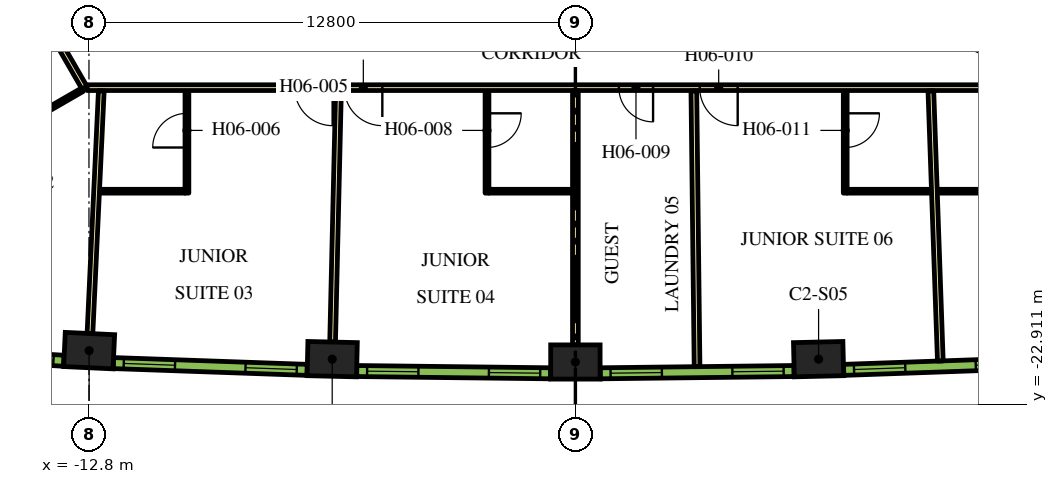
"""IFC4 building model, lengths in metres.
Left out: names, types, materials, properties, quantities, classifications, styles, units other than length and angle.
Written with IfcOpenShell. Run it as: python <this file> out.ifc"""

import sys

from ifc_helpers import new_model, si_unit, direction, frame, frame_2d, origin, origin_2d, place, context, subcontext, project, spatial, rectangle, extrude, element, fill, save


model = new_model("IFC4")
c1 = context("Model", 3, precision=1e-05, world=origin(), true_north=direction((0.0, 1.0)))
c2 = subcontext(c1, "Body", "Model", "MODEL_VIEW")
j1 = project(units=[si_unit("LENGTHUNIT", "METRE"), si_unit("PLANEANGLEUNIT", "RADIAN")], contexts=[c1])
p1 = place(None, origin())
s1 = spatial("IfcSite", under=j1, at=p1, CompositionType="ELEMENT")
p2 = place(p1, origin())
s2 = spatial("IfcBuilding", under=s1, at=p2, CompositionType="ELEMENT")
p3 = place(p2, frame((0.0, 0.0, 83.7)))
s3 = spatial("IfcBuildingStorey", under=s2, at=p3, CompositionType="ELEMENT", Elevation=83.7)
for number, where, z_axis, x_axis in (
    (1, (-12.795, -21.494, 0.0), (0.0, 0.0, 1.0), (0.999, -0.047, 0.0)),
    (2, (-6.399, -21.719, 0.0), (0.0, 0.0, 1.0), (1.0, -0.023, 0.0)),
    (3, (0.0, -21.794, 0.0), (0.0, 0.0, 1.0), (1.0, 0.0, 0.0)),
    (4, (6.399, -21.719, 0.0), (0.0, 0.0, 1.0), (1.0, 0.023, 0.0)),
):
    element("IfcColumn", number, at=place(p3, frame(where, z_axis=z_axis, x_axis=x_axis)), inside=s3, PredefinedType="COLUMN", context=c2, shape_type="SweptSolid", body=[
        extrude(rectangle(XDim=1.3, YDim=0.9, at=origin_2d()), origin(), (0.0, 0.0, 1.0), 3.9),
    ])
p4 = place(p3, frame((-12.918, -14.575, 0.0), z_axis=(0.0, 0.0, 1.0), x_axis=(-0.500009150678, 0.866020120573, 0.0)))
e5 = element("IfcWall", 5, at=p4, inside=s3, PredefinedType="PARTITIONING", context=c2, shape_type="SweptSolid", body=[
    extrude(rectangle(XDim=5.258, YDim=0.15, at=frame_2d((2.629, 0.0))), origin(), (0.0, 0.0, 1.0), 2.75),
])
p5 = place(p4, frame((4.078, 0.0, 0.0)))
e6 = element("IfcOpeningElement", 6, at=p5, cuts=e5, PredefinedType="OPENING", context=c2, shape_type="SweptSolid", body=[
    extrude(rectangle(XDim=1.0, YDim=2.1, at=frame_2d((0.5, 1.05))), frame((0.0, 0.085, 0.0), z_axis=(0.0, -1.0, 0.0), x_axis=(1.0, 0.0, 0.0)), (0.0, 0.0, 1.0), 0.17),
])
p6 = place(p3, frame((12.918, -14.575, 0.0), z_axis=(0.0, 0.0, 1.0), x_axis=(-1.0, 0.0, 0.0)))
e7 = element("IfcWall", 7, at=p6, inside=s3, PredefinedType="PARTITIONING", context=c2, shape_type="SweptSolid", body=[
    extrude(rectangle(XDim=25.766, YDim=0.15, at=frame_2d((12.883, 0.0))), origin(), (0.0, 0.0, 1.0), 2.75),
])
p7 = place(p6, frame((19.306, 0.0, 0.0)))
e8 = element("IfcOpeningElement", 8, at=p7, cuts=e7, PredefinedType="OPENING", context=c2, shape_type="SweptSolid", body=[
    extrude(rectangle(XDim=1.0, YDim=2.1, at=frame_2d((0.5, 1.05))), frame((0.0, 0.085, 0.0), z_axis=(0.0, -1.0, 0.0), x_axis=(1.0, 0.0, 0.0)), (0.0, 0.0, 1.0), 0.17),
])
p8 = place(p6, frame((17.999, 0.0, 0.0)))
e9 = element("IfcOpeningElement", 9, at=p8, cuts=e7, PredefinedType="OPENING", context=c2, shape_type="SweptSolid", body=[
    extrude(rectangle(XDim=1.0, YDim=2.1, at=frame_2d((0.5, 1.05))), frame((0.0, 0.085, 0.0), z_axis=(0.0, -1.0, 0.0), x_axis=(1.0, 0.0, 0.0)), (0.0, 0.0, 1.0), 0.17),
])
p9 = place(p6, frame((10.874, 0.0, 0.0)))
e10 = element("IfcOpeningElement", 10, at=p9, cuts=e7, PredefinedType="OPENING", context=c2, shape_type="SweptSolid", body=[
    extrude(rectangle(XDim=0.9, YDim=2.1, at=frame_2d((0.45, 1.05))), frame((0.0, 0.085, 0.0), z_axis=(0.0, -1.0, 0.0), x_axis=(1.0, 0.0, 0.0)), (0.0, 0.0, 1.0), 0.17),
])
p10 = place(p6, frame((8.647, 0.0, 0.0)))
e11 = element("IfcOpeningElement", 11, at=p10, cuts=e7, PredefinedType="OPENING", context=c2, shape_type="SweptSolid", body=[
    extrude(rectangle(XDim=1.0, YDim=2.1, at=frame_2d((0.5, 1.05))), frame((0.0, 0.085, 0.0), z_axis=(0.0, -1.0, 0.0), x_axis=(1.0, 0.0, 0.0)), (0.0, 0.0, 1.0), 0.17),
])
p11 = place(p6, frame((0.18, 0.0, 0.0)))
e12 = element("IfcOpeningElement", 12, at=p11, cuts=e7, PredefinedType="OPENING", context=c2, shape_type="SweptSolid", body=[
    extrude(rectangle(XDim=1.0, YDim=2.1, at=frame_2d((0.5, 1.05))), frame((0.0, 0.085, 0.0), z_axis=(0.0, -1.0, 0.0), x_axis=(1.0, 0.0, 0.0)), (0.0, 0.0, 1.0), 0.17),
])
p12 = place(p3, frame((-12.774, -21.045, 0.0), z_axis=(0.0, 0.0, 1.0), x_axis=(0.046750341626, 0.998906605023, 0.0)))
e13 = element("IfcWall", 13, at=p12, inside=s3, PredefinedType="PARTITIONING", context=c2, shape_type="SweptSolid", body=[
    extrude(rectangle(XDim=6.392, YDim=0.15, at=frame_2d((3.196, 0.0))), origin(), (0.0, 0.0, 1.0), 2.75),
])
p13 = place(p3, frame((-6.389, -21.269, 0.0), z_axis=(0.0, 0.0, 1.0), x_axis=(0.023377429176, 0.999726710559, 0.0)))
e14 = element("IfcWall", 14, at=p13, inside=s3, PredefinedType="PARTITIONING", context=c2, shape_type="SweptSolid", body=[
    extrude(rectangle(XDim=6.611, YDim=0.15, at=frame_2d((3.305, 0.0))), origin(), (0.0, 0.0, 1.0), 2.75),
])
p14 = place(p3, frame((0.0, -21.344, 0.0), z_axis=(0.0, 0.0, 1.0), x_axis=(0.0, 1.0, 0.0)))
e15 = element("IfcWall", 15, at=p14, inside=s3, PredefinedType="PARTITIONING", context=c2, shape_type="SweptSolid", body=[
    extrude(rectangle(XDim=6.694, YDim=0.15, at=frame_2d((3.347, 0.0))), origin(), (0.0, 0.0, 1.0), 2.75),
])
p15 = place(p3, frame((3.202, -21.916, 0.0), z_axis=(0.0, 0.0, 1.0), x_axis=(-0.011707696285, 0.999931462575, 0.0)))
e16 = element("IfcWall", 16, at=p15, inside=s3, PredefinedType="PARTITIONING", context=c2, shape_type="SweptSolid", body=[
    extrude(rectangle(XDim=7.257, YDim=0.15, at=frame_2d((3.628, 0.0))), origin(), (0.0, 0.0, 1.0), 2.75),
])
p16 = place(p3, frame((9.603, -21.767, 0.0), z_axis=(0.0, 0.0, 1.0), x_axis=(-0.035053506859, 0.999385436985, 0.0)))
e17 = element("IfcWall", 17, at=p16, inside=s3, PredefinedType="PARTITIONING", context=c2, shape_type="SweptSolid", body=[
    extrude(rectangle(XDim=7.111, YDim=0.15, at=frame_2d((3.556, 0.0))), origin(), (0.0, 0.0, 1.0), 2.75),
])
p17 = place(p3, frame((-12.973, -14.63, 0.0), z_axis=(0.0, 0.0, 1.0), x_axis=(-0.866036505625, -0.499980770555, 0.0)))
e18 = element("IfcWall", 18, at=p17, inside=s3, PredefinedType="PARTITIONING", context=c2, shape_type="SweptSolid", body=[
    extrude(rectangle(XDim=2.7, YDim=0.1, at=frame_2d((1.35, 0.0))), origin(), (0.0, 0.0, 1.0), 2.75),
])
p18 = place(p3, frame((-10.222, -17.35, 0.0), z_axis=(0.0, 0.0, 1.0), x_axis=(0.0, 1.0, 0.0)))
e19 = element("IfcWall", 19, at=p18, inside=s3, PredefinedType="PARTITIONING", context=c2, shape_type="SweptSolid", body=[
    extrude(rectangle(XDim=2.7, YDim=0.1, at=frame_2d((1.35, 0.0))), origin(), (0.0, 0.0, 1.0), 2.75),
])
p19 = place(p18, frame((1.2, 0.0, 0.0)))
e20 = element("IfcOpeningElement", 20, at=p19, cuts=e19, PredefinedType="OPENING", context=c2, shape_type="SweptSolid", body=[
    extrude(rectangle(XDim=0.9, YDim=2.1, at=frame_2d((0.45, 1.05))), frame((0.0, 0.06, 0.0), z_axis=(0.0, -1.0, 0.0), x_axis=(1.0, 0.0, 0.0)), (0.0, 0.0, 1.0), 0.12),
])
p20 = place(p3, frame((-10.272, -17.3, 0.0), z_axis=(0.0, 0.0, 1.0), x_axis=(-1.0, 0.0, 0.0)))
e21 = element("IfcWall", 21, at=p20, inside=s3, PredefinedType="PARTITIONING", context=c2, shape_type="SweptSolid", body=[
    extrude(rectangle(XDim=2.25, YDim=0.1, at=frame_2d((1.125, 0.0))), origin(), (0.0, 0.0, 1.0), 2.75),
])
p21 = place(p3, frame((-2.326, -14.65, 0.0), z_axis=(0.0, 0.0, 1.0), x_axis=(0.0, -1.0, 0.0)))
e22 = element("IfcWall", 22, at=p21, inside=s3, PredefinedType="PARTITIONING", context=c2, shape_type="SweptSolid", body=[
    extrude(rectangle(XDim=2.7, YDim=0.1, at=frame_2d((1.35, 0.0))), origin(), (0.0, 0.0, 1.0), 2.75),
])
p22 = place(p21, frame((0.6, 0.0, 0.0)))
e23 = element("IfcOpeningElement", 23, at=p22, cuts=e22, PredefinedType="OPENING", context=c2, shape_type="SweptSolid", body=[
    extrude(rectangle(XDim=0.9, YDim=2.1, at=frame_2d((0.45, 1.05))), frame((0.0, 0.06, 0.0), z_axis=(0.0, -1.0, 0.0), x_axis=(1.0, 0.0, 0.0)), (0.0, 0.0, 1.0), 0.12),
])
p23 = place(p3, frame((-2.276, -17.3, 0.0), z_axis=(0.0, 0.0, 1.0), x_axis=(1.0, 0.0, 0.0)))
e24 = element("IfcWall", 24, at=p23, inside=s3, PredefinedType="PARTITIONING", context=c2, shape_type="SweptSolid", body=[
    extrude(rectangle(XDim=2.2, YDim=0.1, at=frame_2d((1.1, 0.0))), origin(), (0.0, 0.0, 1.0), 2.75),
])
p24 = place(p3, frame((7.1, -14.65, 0.0), z_axis=(0.0, 0.0, 1.0), x_axis=(0.0, -1.0, 0.0)))
e25 = element("IfcWall", 25, at=p24, inside=s3, PredefinedType="PARTITIONING", context=c2, shape_type="SweptSolid", body=[
    extrude(rectangle(XDim=2.7, YDim=0.1, at=frame_2d((1.35, 0.0))), origin(), (0.0, 0.0, 1.0), 2.75),
])
p25 = place(p24, frame((0.6, 0.0, 0.0)))
e26 = element("IfcOpeningElement", 26, at=p25, cuts=e25, PredefinedType="OPENING", context=c2, shape_type="SweptSolid", body=[
    extrude(rectangle(XDim=0.9, YDim=2.1, at=frame_2d((0.45, 1.05))), frame((0.0, 0.06, 0.0), z_axis=(0.0, -1.0, 0.0), x_axis=(1.0, 0.0, 0.0)), (0.0, 0.0, 1.0), 0.12),
])
p26 = place(p3, frame((7.15, -17.3, 0.0), z_axis=(0.0, 0.0, 1.0), x_axis=(1.0, 0.0, 0.0)))
e27 = element("IfcWall", 27, at=p26, inside=s3, PredefinedType="PARTITIONING", context=c2, shape_type="SweptSolid", body=[
    extrude(rectangle(XDim=2.22, YDim=0.1, at=frame_2d((1.11, 0.0))), origin(), (0.0, 0.0, 1.0), 2.75),
])
p27 = place(p3, frame((11.557, -17.3, 0.0), z_axis=(0.0, 0.0, 1.0), x_axis=(-1.0, 0.0, 0.0)))
e28 = element("IfcWall", 28, at=p27, inside=s3, PredefinedType="PARTITIONING", context=c2, shape_type="SweptSolid", body=[
    extrude(rectangle(XDim=2.03, YDim=0.1, at=frame_2d((1.015, 0.0))), origin(), (0.0, 0.0, 1.0), 2.75),
])
p28 = place(p3, frame((-18.553, -21.463, 0.0), z_axis=(0.0, 0.0, 1.0), x_axis=(0.998290511436, -0.058447025388, 0.0)))
e29 = element("IfcWall", 29, at=p28, inside=s3, PredefinedType="SOLIDWALL", context=c2, shape_type="SweptSolid", body=[
    extrude(rectangle(XDim=5.1, YDim=0.29, at=frame_2d((2.55, 0.0))), origin(), (0.0, 0.0, 1.0), 3.65),
])
p29 = place(p28, frame((0.273, 0.0, 0.9)))
e30 = element("IfcOpeningElement", 30, at=p29, cuts=e29, PredefinedType="OPENING", context=c2, shape_type="SweptSolid", body=[
    extrude(rectangle(XDim=1.35, YDim=2.15, at=frame_2d((0.675, 1.075))), frame((0.0, 0.155, 0.0), z_axis=(0.0, -1.0, 0.0), x_axis=(1.0, 0.0, 0.0)), (0.0, 0.0, 1.0), 0.31),
])
p30 = place(p28, frame((3.478, 0.0, 0.9)))
e31 = element("IfcOpeningElement", 31, at=p30, cuts=e29, PredefinedType="OPENING", context=c2, shape_type="SweptSolid", body=[
    extrude(rectangle(XDim=1.35, YDim=2.15, at=frame_2d((0.675, 1.075))), frame((0.0, 0.155, 0.0), z_axis=(0.0, -1.0, 0.0), x_axis=(1.0, 0.0, 0.0)), (0.0, 0.0, 1.0), 0.31),
])
p31 = place(p3, frame((-12.157, -21.822, 0.0), z_axis=(0.0, 0.0, 1.0), x_axis=(0.999385993957, -0.035037623812, 0.0)))
e32 = element("IfcWall", 32, at=p31, inside=s3, PredefinedType="SOLIDWALL", context=c2, shape_type="SweptSolid", body=[
    extrude(rectangle(XDim=5.101, YDim=0.29, at=frame_2d((2.55, 0.0))), origin(), (0.0, 0.0, 1.0), 3.65),
])
p32 = place(p31, frame((0.273, 0.0, 0.9)))
e33 = element("IfcOpeningElement", 33, at=p32, cuts=e32, PredefinedType="OPENING", context=c2, shape_type="SweptSolid", body=[
    extrude(rectangle(XDim=1.35, YDim=2.15, at=frame_2d((0.675, 1.075))), frame((0.0, 0.155, 0.0), z_axis=(0.0, -1.0, 0.0), x_axis=(1.0, 0.0, 0.0)), (0.0, 0.0, 1.0), 0.31),
])
p33 = place(p31, frame((3.478, 0.0, 0.9)))
e34 = element("IfcOpeningElement", 34, at=p33, cuts=e32, PredefinedType="OPENING", context=c2, shape_type="SweptSolid", body=[
    extrude(rectangle(XDim=1.35, YDim=2.15, at=frame_2d((0.675, 1.075))), frame((0.0, 0.155, 0.0), z_axis=(0.0, -1.0, 0.0), x_axis=(1.0, 0.0, 0.0)), (0.0, 0.0, 1.0), 0.31),
])
p34 = place(p3, frame((-5.753, -22.031, 0.0), z_axis=(0.0, 0.0, 1.0), x_axis=(0.999931786565, -0.011679992145, 0.0)))
e35 = element("IfcWall", 35, at=p34, inside=s3, PredefinedType="SOLIDWALL", context=c2, shape_type="SweptSolid", body=[
    extrude(rectangle(XDim=5.1, YDim=0.29, at=frame_2d((2.55, 0.0))), origin(), (0.0, 0.0, 1.0), 3.65),
])
p35 = place(p34, frame((0.272, 0.0, 0.9)))
e36 = element("IfcOpeningElement", 36, at=p35, cuts=e35, PredefinedType="OPENING", context=c2, shape_type="SweptSolid", body=[
    extrude(rectangle(XDim=1.35, YDim=2.15, at=frame_2d((0.675, 1.075))), frame((0.0, 0.155, 0.0), z_axis=(0.0, -1.0, 0.0), x_axis=(1.0, 0.0, 0.0)), (0.0, 0.0, 1.0), 0.31),
])
p36 = place(p34, frame((3.478, 0.0, 0.9)))
e37 = element("IfcOpeningElement", 37, at=p36, cuts=e35, PredefinedType="OPENING", context=c2, shape_type="SweptSolid", body=[
    extrude(rectangle(XDim=1.35, YDim=2.15, at=frame_2d((0.675, 1.075))), frame((0.0, 0.155, 0.0), z_axis=(0.0, -1.0, 0.0), x_axis=(1.0, 0.0, 0.0)), (0.0, 0.0, 1.0), 0.31),
])
p37 = place(p3, frame((0.653, -22.091, 0.0), z_axis=(0.0, 0.0, 1.0), x_axis=(0.999931786565, 0.011679992145, 0.0)))
e38 = element("IfcWall", 38, at=p37, inside=s3, PredefinedType="SOLIDWALL", context=c2, shape_type="SweptSolid", body=[
    extrude(rectangle(XDim=5.1, YDim=0.29, at=frame_2d((2.55, 0.0))), origin(), (0.0, 0.0, 1.0), 3.65),
])
p38 = place(p37, frame((0.273, 0.0, 0.9)))
e39 = element("IfcOpeningElement", 39, at=p38, cuts=e38, PredefinedType="OPENING", context=c2, shape_type="SweptSolid", body=[
    extrude(rectangle(XDim=1.35, YDim=2.15, at=frame_2d((0.675, 1.075))), frame((0.0, 0.155, 0.0), z_axis=(0.0, -1.0, 0.0), x_axis=(1.0, 0.0, 0.0)), (0.0, 0.0, 1.0), 0.31),
])
p39 = place(p37, frame((3.478, 0.0, 0.9)))
e40 = element("IfcOpeningElement", 40, at=p39, cuts=e38, PredefinedType="OPENING", context=c2, shape_type="SweptSolid", body=[
    extrude(rectangle(XDim=1.35, YDim=2.15, at=frame_2d((0.675, 1.075))), frame((0.0, 0.155, 0.0), z_axis=(0.0, -1.0, 0.0), x_axis=(1.0, 0.0, 0.0)), (0.0, 0.0, 1.0), 0.31),
])
p40 = place(p3, frame((7.059, -22.001, 0.0), z_axis=(0.0, 0.0, 1.0), x_axis=(0.999385993957, 0.035037623812, 0.0)))
e41 = element("IfcWall", 41, at=p40, inside=s3, PredefinedType="SOLIDWALL", context=c2, shape_type="SweptSolid", body=[
    extrude(rectangle(XDim=5.101, YDim=0.29, at=frame_2d((2.55, 0.0))), origin(), (0.0, 0.0, 1.0), 3.65),
])
p41 = place(p40, frame((0.273, 0.0, 0.9)))
e42 = element("IfcOpeningElement", 42, at=p41, cuts=e41, PredefinedType="OPENING", context=c2, shape_type="SweptSolid", body=[
    extrude(rectangle(XDim=1.35, YDim=2.15, at=frame_2d((0.675, 1.075))), frame((0.0, 0.155, 0.0), z_axis=(0.0, -1.0, 0.0), x_axis=(1.0, 0.0, 0.0)), (0.0, 0.0, 1.0), 0.31),
])
p42 = place(p40, frame((3.478, 0.0, 0.9)))
e43 = element("IfcOpeningElement", 43, at=p42, cuts=e41, PredefinedType="OPENING", context=c2, shape_type="SweptSolid", body=[
    extrude(rectangle(XDim=1.35, YDim=2.15, at=frame_2d((0.675, 1.075))), frame((0.0, 0.155, 0.0), z_axis=(0.0, -1.0, 0.0), x_axis=(1.0, 0.0, 0.0)), (0.0, 0.0, 1.0), 0.31),
])
p43 = place(p7, origin())
e44 = element("IfcDoor", 44, at=p43, inside=s3, OperationType="SINGLE_SWING_LEFT", PredefinedType="DOOR", context=c2, shape_type="SweptSolid", body=[
    extrude(rectangle(XDim=1.0, YDim=2.1, at=frame_2d((0.5, 1.05))), frame((0.0, 0.025, 0.0), z_axis=(0.0, -1.0, 0.0), x_axis=(1.0, 0.0, 0.0)), (0.0, 0.0, 1.0), 0.05),
])
fill(e8, e44)
p44 = place(p19, origin())
e45 = element("IfcDoor", 45, at=p44, inside=s3, OperationType="SINGLE_SWING_RIGHT", PredefinedType="DOOR", context=c2, shape_type="SweptSolid", body=[
    extrude(rectangle(XDim=0.9, YDim=2.1, at=frame_2d((0.45, 1.05))), frame((0.0, 0.025, 0.0), z_axis=(0.0, -1.0, 0.0), x_axis=(1.0, 0.0, 0.0)), (0.0, 0.0, 1.0), 0.05),
])
fill(e20, e45)
p45 = place(p8, origin())
e46 = element("IfcDoor", 46, at=p45, inside=s3, OperationType="SINGLE_SWING_RIGHT", PredefinedType="DOOR", context=c2, shape_type="SweptSolid", body=[
    extrude(rectangle(XDim=1.0, YDim=2.1, at=frame_2d((0.5, 1.05))), frame((0.0, 0.025, 0.0), z_axis=(0.0, -1.0, 0.0), x_axis=(1.0, 0.0, 0.0)), (0.0, 0.0, 1.0), 0.05),
])
fill(e9, e46)
p46 = place(p22, origin())
e47 = element("IfcDoor", 47, at=p46, inside=s3, OperationType="SINGLE_SWING_LEFT", PredefinedType="DOOR", context=c2, shape_type="SweptSolid", body=[
    extrude(rectangle(XDim=0.9, YDim=2.1, at=frame_2d((0.45, 1.05))), frame((0.0, 0.025, 0.0), z_axis=(0.0, -1.0, 0.0), x_axis=(1.0, 0.0, 0.0)), (0.0, 0.0, 1.0), 0.05),
])
fill(e23, e47)
p47 = place(p9, origin())
e48 = element("IfcDoor", 48, at=p47, inside=s3, OperationType="SINGLE_SWING_LEFT", PredefinedType="DOOR", context=c2, shape_type="SweptSolid", body=[
    extrude(rectangle(XDim=0.9, YDim=2.1, at=frame_2d((0.45, 1.05))), frame((0.0, 0.025, 0.0), z_axis=(0.0, -1.0, 0.0), x_axis=(1.0, 0.0, 0.0)), (0.0, 0.0, 1.0), 0.05),
])
fill(e10, e48)
p48 = place(p10, origin())
e49 = element("IfcDoor", 49, at=p48, inside=s3, OperationType="SINGLE_SWING_RIGHT", PredefinedType="DOOR", context=c2, shape_type="SweptSolid", body=[
    extrude(rectangle(XDim=1.0, YDim=2.1, at=frame_2d((0.5, 1.05))), frame((0.0, 0.025, 0.0), z_axis=(0.0, -1.0, 0.0), x_axis=(1.0, 0.0, 0.0)), (0.0, 0.0, 1.0), 0.05),
])
fill(e11, e49)
p49 = place(p25, origin())
e50 = element("IfcDoor", 50, at=p49, inside=s3, OperationType="SINGLE_SWING_RIGHT", PredefinedType="DOOR", context=c2, shape_type="SweptSolid", body=[
    extrude(rectangle(XDim=0.9, YDim=2.1, at=frame_2d((0.45, 1.05))), frame((0.0, 0.025, 0.0), z_axis=(0.0, -1.0, 0.0), x_axis=(1.0, 0.0, 0.0)), (0.0, 0.0, 1.0), 0.05),
])
fill(e26, e50)
p50 = place(p30, origin())
e51 = element("IfcWindow", 51, at=p50, inside=s3, PartitioningType="DOUBLE_PANEL_VERTICAL", PredefinedType="WINDOW", context=c2, shape_type="SweptSolid", body=[
    extrude(rectangle(XDim=1.35, YDim=2.15, at=frame_2d((0.675, 1.075))), frame((0.0, 0.015, 0.0), z_axis=(0.0, -1.0, 0.0), x_axis=(1.0, 0.0, 0.0)), (0.0, 0.0, 1.0), 0.06),
])
fill(e31, e51)
p51 = place(p32, origin())
e52 = element("IfcWindow", 52, at=p51, inside=s3, PartitioningType="DOUBLE_PANEL_VERTICAL", PredefinedType="WINDOW", context=c2, shape_type="SweptSolid", body=[
    extrude(rectangle(XDim=1.35, YDim=2.15, at=frame_2d((0.675, 1.075))), frame((0.0, 0.015, 0.0), z_axis=(0.0, -1.0, 0.0), x_axis=(1.0, 0.0, 0.0)), (0.0, 0.0, 1.0), 0.06),
])
fill(e33, e52)
p52 = place(p33, origin())
e53 = element("IfcWindow", 53, at=p52, inside=s3, PartitioningType="DOUBLE_PANEL_VERTICAL", PredefinedType="WINDOW", context=c2, shape_type="SweptSolid", body=[
    extrude(rectangle(XDim=1.35, YDim=2.15, at=frame_2d((0.675, 1.075))), frame((0.0, 0.015, 0.0), z_axis=(0.0, -1.0, 0.0), x_axis=(1.0, 0.0, 0.0)), (0.0, 0.0, 1.0), 0.06),
])
fill(e34, e53)
p53 = place(p35, origin())
e54 = element("IfcWindow", 54, at=p53, inside=s3, PartitioningType="DOUBLE_PANEL_VERTICAL", PredefinedType="WINDOW", context=c2, shape_type="SweptSolid", body=[
    extrude(rectangle(XDim=1.35, YDim=2.15, at=frame_2d((0.675, 1.075))), frame((0.0, 0.015, 0.0), z_axis=(0.0, -1.0, 0.0), x_axis=(1.0, 0.0, 0.0)), (0.0, 0.0, 1.0), 0.06),
])
fill(e36, e54)
p54 = place(p36, origin())
e55 = element("IfcWindow", 55, at=p54, inside=s3, PartitioningType="DOUBLE_PANEL_VERTICAL", PredefinedType="WINDOW", context=c2, shape_type="SweptSolid", body=[
    extrude(rectangle(XDim=1.35, YDim=2.15, at=frame_2d((0.675, 1.075))), frame((0.0, 0.015, 0.0), z_axis=(0.0, -1.0, 0.0), x_axis=(1.0, 0.0, 0.0)), (0.0, 0.0, 1.0), 0.06),
])
fill(e37, e55)
p55 = place(p38, origin())
e56 = element("IfcWindow", 56, at=p55, inside=s3, PartitioningType="DOUBLE_PANEL_VERTICAL", PredefinedType="WINDOW", context=c2, shape_type="SweptSolid", body=[
    extrude(rectangle(XDim=1.35, YDim=2.15, at=frame_2d((0.675, 1.075))), frame((0.0, 0.015, 0.0), z_axis=(0.0, -1.0, 0.0), x_axis=(1.0, 0.0, 0.0)), (0.0, 0.0, 1.0), 0.06),
])
fill(e39, e56)
p56 = place(p39, origin())
e57 = element("IfcWindow", 57, at=p56, inside=s3, PartitioningType="DOUBLE_PANEL_VERTICAL", PredefinedType="WINDOW", context=c2, shape_type="SweptSolid", body=[
    extrude(rectangle(XDim=1.35, YDim=2.15, at=frame_2d((0.675, 1.075))), frame((0.0, 0.015, 0.0), z_axis=(0.0, -1.0, 0.0), x_axis=(1.0, 0.0, 0.0)), (0.0, 0.0, 1.0), 0.06),
])
fill(e40, e57)
p57 = place(p41, origin())
e58 = element("IfcWindow", 58, at=p57, inside=s3, PartitioningType="DOUBLE_PANEL_VERTICAL", PredefinedType="WINDOW", context=c2, shape_type="SweptSolid", body=[
    extrude(rectangle(XDim=1.35, YDim=2.15, at=frame_2d((0.675, 1.075))), frame((0.0, 0.015, 0.0), z_axis=(0.0, -1.0, 0.0), x_axis=(1.0, 0.0, 0.0)), (0.0, 0.0, 1.0), 0.06),
])
fill(e42, e58)
p58 = place(p42, origin())
e59 = element("IfcWindow", 59, at=p58, inside=s3, PartitioningType="DOUBLE_PANEL_VERTICAL", PredefinedType="WINDOW", context=c2, shape_type="SweptSolid", body=[
    extrude(rectangle(XDim=1.35, YDim=2.15, at=frame_2d((0.675, 1.075))), frame((0.0, 0.015, 0.0), z_axis=(0.0, -1.0, 0.0), x_axis=(1.0, 0.0, 0.0)), (0.0, 0.0, 1.0), 0.06),
])
fill(e43, e59)
save(model, sys.argv[1])
